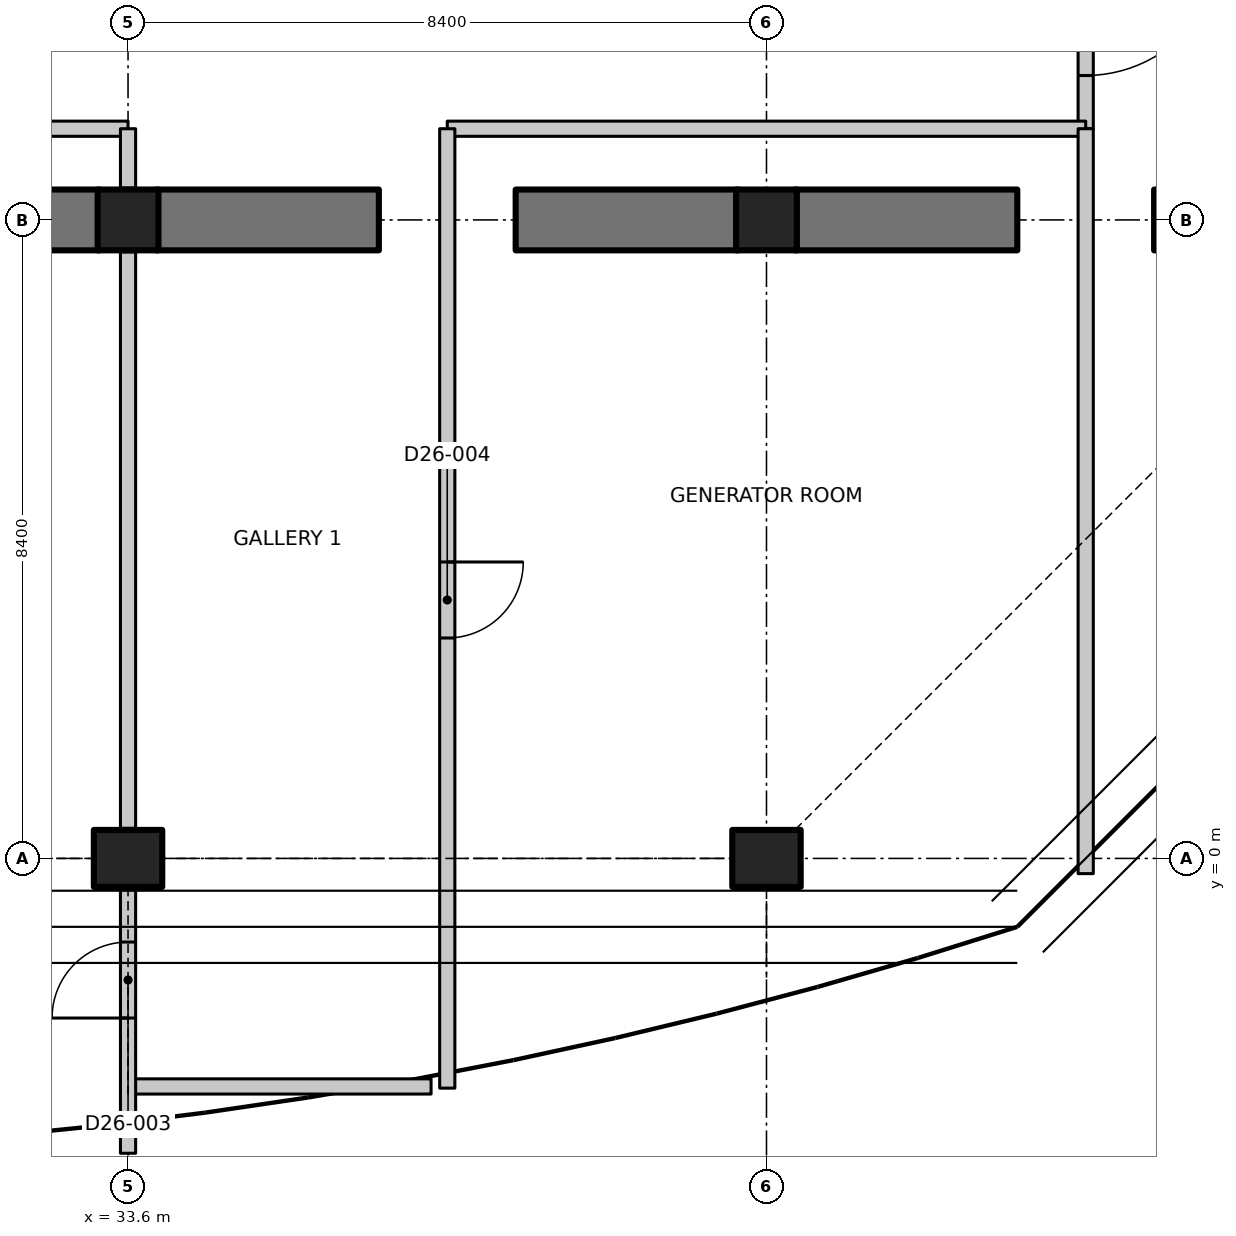
"""IFC4 building model, lengths in metres.
Left out: names, types, materials, properties, quantities, classifications, styles, units other than length and angle.
Written with IfcOpenShell. Run it as: python <this file> out.ifc"""

import sys

from ifc_helpers import new_model, si_unit, direction, frame, frame_2d, origin, origin_2d, place, context, subcontext, project, spatial, polyline, rectangle, outline, extrude, element, fill, save


model = new_model("IFC4")
c1 = context("Model", 3, precision=1e-05, world=origin(), true_north=direction((0.0, 1.0)))
c2 = subcontext(c1, "Body", "Model", "MODEL_VIEW")
j1 = project(units=[si_unit("LENGTHUNIT", "METRE"), si_unit("PLANEANGLEUNIT", "RADIAN")], contexts=[c1])
p1 = place(None, origin())
s1 = spatial("IfcSite", under=j1, at=p1, CompositionType="ELEMENT")
p2 = place(p1, origin())
s2 = spatial("IfcBuilding", under=s1, at=p2, CompositionType="ELEMENT")
p3 = place(p2, frame((0.0, 0.0, 210.9)))
s3 = spatial("IfcBuildingStorey", under=s2, at=p3, CompositionType="ELEMENT", Elevation=210.9)
p4 = place(p3, frame((33.6, 0.0, 0.0), z_axis=(0.0, 0.0, 1.0), x_axis=(0.0, 1.0, 0.0)))
e1 = element("IfcColumn", 1, at=p4, inside=s3, PredefinedType="COLUMN", context=c2, shape_type="SweptSolid", body=[
    extrude(rectangle(XDim=0.75, YDim=0.9, at=origin_2d()), origin(), (0.0, 0.0, 1.0), 4.55),
])
p5 = place(p3, frame((33.6, 8.4, 0.0), z_axis=(0.0, 0.0, 1.0), x_axis=(1.0, 0.0, 0.0)))
e2 = element("IfcColumn", 2, at=p5, inside=s3, PredefinedType="COLUMN", context=c2, shape_type="SweptSolid", body=[
    extrude(rectangle(XDim=0.8, YDim=0.8, at=origin_2d()), origin(), (0.0, 0.0, 1.0), 4.55),
])
p6 = place(p3, frame((42.0, 0.0, 0.0), z_axis=(0.0, 0.0, 1.0), x_axis=(0.0, 1.0, 0.0)))
e3 = element("IfcColumn", 3, at=p6, inside=s3, PredefinedType="COLUMN", context=c2, shape_type="SweptSolid", body=[
    extrude(rectangle(XDim=0.75, YDim=0.9, at=origin_2d()), origin(), (0.0, 0.0, 1.0), 4.55),
])
p7 = place(p3, frame((42.0, 8.4, 0.0), z_axis=(0.0, 0.0, 1.0), x_axis=(1.0, 0.0, 0.0)))
e4 = element("IfcColumn", 4, at=p7, inside=s3, PredefinedType="COLUMN", context=c2, shape_type="SweptSolid", body=[
    extrude(rectangle(XDim=0.8, YDim=0.8, at=origin_2d()), origin(), (0.0, 0.0, 1.0), 4.55),
])
p8 = place(p3, frame((30.115, 8.4, 0.0), z_axis=(0.0, 0.0, 1.0), x_axis=(1.0, 0.0, 0.0)))
e5 = element("IfcWall", 5, at=p8, inside=s3, PredefinedType="SHEAR", context=c2, shape_type="SweptSolid", body=[
    extrude(rectangle(XDim=3.115, YDim=0.8, at=frame_2d((1.558, 0.0))), origin(), (0.0, 0.0, 1.0), 4.55),
])
for number, where, z_axis, x_axis in (
    (6, (33.97, 8.4, 0.0), (0.0, 0.0, 1.0), (1.0, 0.0, 0.0)),
    (7, (38.7, 8.4, 0.0), (0.0, 0.0, 1.0), (1.0, 0.0, 0.0)),
    (8, (42.37, 8.4, 0.0), (0.0, 0.0, 1.0), (1.0, 0.0, 0.0)),
    (9, (47.1, 8.4, 0.0), (0.0, 0.0, 1.0), (1.0, 0.0, 0.0)),
):
    element("IfcWall", number, at=place(p3, frame(where, z_axis=z_axis, x_axis=x_axis)), inside=s3, PredefinedType="SHEAR", context=c2, shape_type="SweptSolid", body=[
        extrude(rectangle(XDim=2.93, YDim=0.8, at=frame_2d((1.465, 0.0))), origin(), (0.0, 0.0, 1.0), 4.55),
    ])
p9 = place(p3, frame((46.2, 13.0, 0.0), z_axis=(0.0, 0.0, 1.0), x_axis=(0.0, -1.0, 0.0)))
e10 = element("IfcWall", 10, at=p9, inside=s3, PredefinedType="PARTITIONING", context=c2, shape_type="SweptSolid", body=[
    extrude(rectangle(XDim=3.4, YDim=0.2, at=frame_2d((1.7, 0.0))), origin(), (0.0, 0.0, 1.0), 4.53),
])
p10 = place(p9, frame((0.9, 0.0, 0.0)))
e11 = element("IfcOpeningElement", 11, at=p10, cuts=e10, PredefinedType="OPENING", context=c2, shape_type="SweptSolid", body=[
    extrude(rectangle(XDim=1.8, YDim=2.1, at=frame_2d((0.9, 1.05))), frame((0.0, 0.11, 0.0), z_axis=(0.0, -1.0, 0.0), x_axis=(1.0, 0.0, 0.0)), (0.0, 0.0, 1.0), 0.22),
])
p11 = place(p3, frame((33.6, 9.6, 0.0), z_axis=(0.0, 0.0, 1.0), x_axis=(-1.0, 0.0, 0.0)))
e12 = element("IfcWall", 12, at=p11, inside=s3, PredefinedType="PARTITIONING", context=c2, shape_type="SweptSolid", body=[
    extrude(rectangle(XDim=4.2, YDim=0.2, at=frame_2d((2.1, 0.0))), origin(), (0.0, 0.0, 1.0), 4.53),
])
p12 = place(p3, frame((46.2, 9.6, 0.0), z_axis=(0.0, 0.0, 1.0), x_axis=(-1.0, 0.0, 0.0)))
e13 = element("IfcWall", 13, at=p12, inside=s3, PredefinedType="PARTITIONING", context=c2, shape_type="SweptSolid", body=[
    extrude(rectangle(XDim=8.4, YDim=0.2, at=frame_2d((4.2, 0.0))), origin(), (0.0, 0.0, 1.0), 4.53),
])
p13 = place(p3, frame((46.2, -0.2, 0.0), z_axis=(0.0, 0.0, 1.0), x_axis=(0.0, 1.0, 0.0)))
e14 = element("IfcWall", 14, at=p13, inside=s3, PredefinedType="PARTITIONING", context=c2, shape_type="SweptSolid", body=[
    extrude(outline(polyline([(0.0, 0.0), (9.8, 0.0), (9.8, 4.53), (5.116, 4.53), (5.114, 4.18), (3.686, 4.18), (3.684, 4.53), (0.0, 4.53), (0.0, 0.0)])), frame((0.0, 0.1, 0.0), z_axis=(0.0, -1.0, 0.0), x_axis=(1.0, 0.0, 0.0)), (0.0, 0.0, 1.0), 0.2),
])
p14 = place(p3, frame((37.587, -3.0, 0.0), z_axis=(0.0, 0.0, 1.0), x_axis=(-1.0, 0.0, 0.0)))
e15 = element("IfcWall", 15, at=p14, inside=s3, PredefinedType="PARTITIONING", context=c2, shape_type="SweptSolid", body=[
    extrude(rectangle(XDim=3.987, YDim=0.2, at=frame_2d((1.993, 0.0))), origin(), (0.0, 0.0, 1.0), 4.18),
])
p15 = place(p3, frame((33.6, -3.879, 0.0), z_axis=(0.0, 0.0, 1.0), x_axis=(0.0, 1.0, 0.0)))
e16 = element("IfcWall", 16, at=p15, inside=s3, PredefinedType="PARTITIONING", context=c2, shape_type="SweptSolid", body=[
    extrude(rectangle(XDim=3.484, YDim=0.2, at=frame_2d((1.742, 0.0))), origin(), (0.0, 0.0, 1.0), 4.18),
])
p16 = place(p15, frame((1.779, 0.0, 0.0)))
e17 = element("IfcOpeningElement", 17, at=p16, cuts=e16, PredefinedType="OPENING", context=c2, shape_type="SweptSolid", body=[
    extrude(rectangle(XDim=1.0, YDim=2.1, at=frame_2d((0.5, 1.05))), frame((0.0, 0.11, 0.0), z_axis=(0.0, -1.0, 0.0), x_axis=(1.0, 0.0, 0.0)), (0.0, 0.0, 1.0), 0.22),
])
p17 = place(p3, frame((33.6, 0.395, 0.0), z_axis=(0.0, 0.0, 1.0), x_axis=(0.0, 1.0, 0.0)))
e18 = element("IfcWall", 18, at=p17, inside=s3, PredefinedType="PARTITIONING", context=c2, shape_type="SweptSolid", body=[
    extrude(outline(polyline([(0.0, 0.0), (7.585, 0.0), (7.585, 4.53), (0.055, 4.53), (0.053, 4.18), (0.0, 4.18), (0.0, 0.0)])), frame((0.0, 0.1, 0.0), z_axis=(0.0, -1.0, 0.0), x_axis=(1.0, 0.0, 0.0)), (0.0, 0.0, 1.0), 0.2),
])
p18 = place(p3, frame((33.6, 8.82, 0.0), z_axis=(0.0, 0.0, 1.0), x_axis=(0.0, 1.0, 0.0)))
e19 = element("IfcWall", 19, at=p18, inside=s3, PredefinedType="PARTITIONING", context=c2, shape_type="SweptSolid", body=[
    extrude(rectangle(XDim=0.78, YDim=0.2, at=frame_2d((0.39, 0.0))), origin(), (0.0, 0.0, 1.0), 4.53),
])
p19 = place(p3, frame((37.8, 9.6, 0.0), z_axis=(0.0, 0.0, 1.0), x_axis=(0.0, -1.0, 0.0)))
e20 = element("IfcWall", 20, at=p19, inside=s3, PredefinedType="PARTITIONING", context=c2, shape_type="SweptSolid", body=[
    extrude(outline(polyline([(0.0, 0.0), (12.622, 0.0), (12.622, 4.53), (10.05, 4.53), (10.048, 4.18), (9.152, 4.18), (9.15, 4.53), (0.0, 4.53), (0.0, 0.0)])), frame((0.0, 0.1, 0.0), z_axis=(0.0, -1.0, 0.0), x_axis=(1.0, 0.0, 0.0)), (0.0, 0.0, 1.0), 0.2),
])
p20 = place(p19, frame((5.7, 0.0, 0.0)))
e21 = element("IfcOpeningElement", 21, at=p20, cuts=e20, PredefinedType="OPENING", context=c2, shape_type="SweptSolid", body=[
    extrude(rectangle(XDim=1.0, YDim=2.1, at=frame_2d((0.5, 1.05))), frame((0.0, 0.11, 0.0), z_axis=(0.0, -1.0, 0.0), x_axis=(1.0, 0.0, 0.0)), (0.0, 0.0, 1.0), 0.22),
])
p21 = place(p10, origin())
e22 = element("IfcDoor", 22, at=p21, inside=s3, OperationType="DOUBLE_DOOR_SINGLE_SWING", PredefinedType="DOOR", context=c2, shape_type="SweptSolid", body=[
    extrude(rectangle(XDim=1.8, YDim=2.1, at=frame_2d((0.9, 1.05))), frame((0.0, 0.025, 0.0), z_axis=(0.0, -1.0, 0.0), x_axis=(1.0, 0.0, 0.0)), (0.0, 0.0, 1.0), 0.05),
])
fill(e11, e22)
p22 = place(p16, origin())
e23 = element("IfcDoor", 23, at=p22, inside=s3, OperationType="SINGLE_SWING_LEFT", PredefinedType="DOOR", context=c2, shape_type="SweptSolid", body=[
    extrude(rectangle(XDim=1.0, YDim=2.1, at=frame_2d((0.5, 1.05))), frame((0.0, 0.025, 0.0), z_axis=(0.0, -1.0, 0.0), x_axis=(1.0, 0.0, 0.0)), (0.0, 0.0, 1.0), 0.05),
])
fill(e17, e23)
p23 = place(p20, origin())
e24 = element("IfcDoor", 24, at=p23, inside=s3, OperationType="SINGLE_SWING_LEFT", PredefinedType="DOOR", context=c2, shape_type="SweptSolid", body=[
    extrude(rectangle(XDim=1.0, YDim=2.1, at=frame_2d((0.5, 1.05))), frame((0.0, 0.025, 0.0), z_axis=(0.0, -1.0, 0.0), x_axis=(1.0, 0.0, 0.0)), (0.0, 0.0, 1.0), 0.05),
])
fill(e21, e24)
save(model, sys.argv[1])
